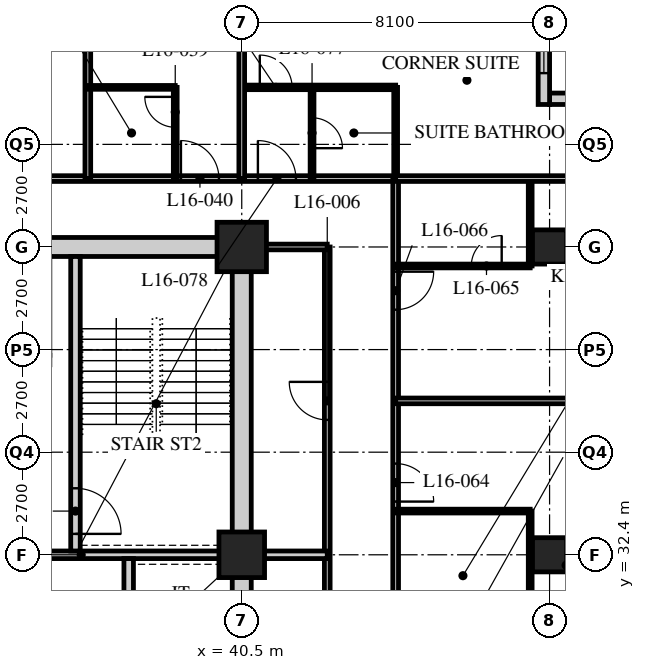
"""IFC4 building model, lengths in metres.
Left out: names, types, materials, properties, quantities, classifications, styles, units other than length and angle.
Written with IfcOpenShell. Run it as: python <this file> out.ifc"""

import sys

from ifc_helpers import new_model, si_unit, direction, frame, frame_2d, origin, origin_2d, place, context, subcontext, project, spatial, rectangle, hollow_rectangle, extrude, element, fill, save


model = new_model("IFC4")
c1 = context("Model", 3, precision=1e-05, world=origin(), true_north=direction((0.0, 1.0)))
c2 = subcontext(c1, "Body", "Model", "MODEL_VIEW")
j1 = project(units=[si_unit("LENGTHUNIT", "METRE"), si_unit("PLANEANGLEUNIT", "RADIAN")], contexts=[c1])
p1 = place(None, origin())
s1 = spatial("IfcSite", under=j1, at=p1, CompositionType="ELEMENT")
p2 = place(p1, origin())
s2 = spatial("IfcBuilding", under=s1, at=p2, CompositionType="ELEMENT")
p3 = place(p2, frame((0.0, 0.0, 67.0)))
s3 = spatial("IfcBuildingStorey", under=s2, at=p3, CompositionType="ELEMENT", Elevation=67.0)
p4 = place(p3, frame((40.5, 32.4, 0.0), z_axis=(0.0, 0.0, 1.0), x_axis=(1.0, 0.0, 0.0)))
e1 = element("IfcColumn", 1, at=p4, inside=s3, PredefinedType="COLUMN", context=c2, shape_type="SweptSolid", body=[
    extrude(hollow_rectangle(XDim=1.2, YDim=1.2, WallThickness=0.12, at=origin_2d()), origin(), (0.0, 0.0, 1.0), 3.4),
])
p5 = place(p3, frame((40.5, 40.5, 0.0), z_axis=(0.0, 0.0, 1.0), x_axis=(1.0, 0.0, 0.0)))
e2 = element("IfcColumn", 2, at=p5, inside=s3, PredefinedType="COLUMN", context=c2, shape_type="SweptSolid", body=[
    extrude(hollow_rectangle(XDim=1.3, YDim=1.3, WallThickness=0.13, at=origin_2d()), origin(), (0.0, 0.0, 1.0), 3.4),
])
for number, where, z_axis, x_axis in (
    (3, (48.6, 32.4, 0.0), (0.0, 0.0, 1.0), (1.0, 0.0, 0.0)),
    (4, (48.6, 40.5, 0.0), (0.0, 0.0, 1.0), (1.0, 0.0, 0.0)),
):
    element("IfcColumn", number, at=place(p3, frame(where, z_axis=z_axis, x_axis=x_axis)), inside=s3, PredefinedType="COLUMN", context=c2, shape_type="SweptSolid", body=[
        extrude(hollow_rectangle(XDim=0.9, YDim=0.9, WallThickness=0.09, at=origin_2d()), origin(), (0.0, 0.0, 1.0), 3.4),
    ])
p6 = place(p3, frame((52.35, 44.4, 0.0), z_axis=(0.0, 0.0, 1.0), x_axis=(-1.0, 0.0, 0.0)))
e5 = element("IfcWall", 5, at=p6, inside=s3, PredefinedType="SOLIDWALL", context=c2, shape_type="SweptSolid", body=[
    extrude(rectangle(XDim=3.75, YDim=0.3, at=frame_2d((1.875, 0.0))), origin(), (0.0, 0.0, 1.0), 3.19),
])
p7 = place(p6, frame((0.225, 0.0, 0.9)))
e6 = element("IfcOpeningElement", 6, at=p7, cuts=e5, PredefinedType="OPENING", context=c2, shape_type="SweptSolid", body=[
    extrude(rectangle(XDim=3.0, YDim=1.5, at=frame_2d((1.5, 0.75))), frame((0.0, 0.16, 0.0), z_axis=(0.0, -1.0, 0.0), x_axis=(1.0, 0.0, 0.0)), (0.0, 0.0, 1.0), 0.32),
])
p8 = place(p3, frame((48.45, 44.25, 0.0), z_axis=(0.0, 0.0, 1.0), x_axis=(0.0, 1.0, 0.0)))
e7 = element("IfcWall", 7, at=p8, inside=s3, PredefinedType="SOLIDWALL", context=c2, shape_type="SweptSolid", body=[
    extrude(rectangle(XDim=4.35, YDim=0.3, at=frame_2d((2.175, 0.0))), origin(), (0.0, 0.0, 1.0), 3.19),
])
p9 = place(p8, frame((0.825, 0.0, 0.9)))
e8 = element("IfcOpeningElement", 8, at=p9, cuts=e7, PredefinedType="OPENING", context=c2, shape_type="SweptSolid", body=[
    extrude(rectangle(XDim=3.0, YDim=1.5, at=frame_2d((1.5, 0.75))), frame((0.0, 0.16, 0.0), z_axis=(0.0, -1.0, 0.0), x_axis=(1.0, 0.0, 0.0)), (0.0, 0.0, 1.0), 0.32),
])
p10 = place(p3, frame((8.1, 42.3, 0.0), z_axis=(0.0, 0.0, 1.0), x_axis=(1.0, 0.0, 0.0)))
e9 = element("IfcWall", 9, at=p10, inside=s3, PredefinedType="PARTITIONING", context=c2, shape_type="SweptSolid", body=[
    extrude(rectangle(XDim=36.45, YDim=0.15, at=frame_2d((18.225, 0.0))), origin(), (0.0, 0.0, 1.0), 3.19),
])
p11 = place(p10, frame((9.5, 0.0, 0.0)))
e10 = element("IfcOpeningElement", 10, at=p11, cuts=e9, PredefinedType="OPENING", context=c2, shape_type="SweptSolid", body=[
    extrude(rectangle(XDim=1.0, YDim=2.1, at=frame_2d((0.5, 1.05))), frame((0.0, 0.085, 0.0), z_axis=(0.0, -1.0, 0.0), x_axis=(1.0, 0.0, 0.0)), (0.0, 0.0, 1.0), 0.17),
])
p12 = place(p10, frame((14.6, 0.0, 0.0)))
e11 = element("IfcOpeningElement", 11, at=p12, cuts=e9, PredefinedType="OPENING", context=c2, shape_type="SweptSolid", body=[
    extrude(rectangle(XDim=1.0, YDim=2.1, at=frame_2d((0.5, 1.05))), frame((0.0, 0.085, 0.0), z_axis=(0.0, -1.0, 0.0), x_axis=(1.0, 0.0, 0.0)), (0.0, 0.0, 1.0), 0.17),
])
p13 = place(p10, frame((18.65, 0.0, 0.0)))
e12 = element("IfcOpeningElement", 12, at=p13, cuts=e9, PredefinedType="OPENING", context=c2, shape_type="SweptSolid", body=[
    extrude(rectangle(XDim=1.0, YDim=2.1, at=frame_2d((0.5, 1.05))), frame((0.0, 0.085, 0.0), z_axis=(0.0, -1.0, 0.0), x_axis=(1.0, 0.0, 0.0)), (0.0, 0.0, 1.0), 0.17),
])
p14 = place(p10, frame((25.7, 0.0, 0.0)))
e13 = element("IfcOpeningElement", 13, at=p14, cuts=e9, PredefinedType="OPENING", context=c2, shape_type="SweptSolid", body=[
    extrude(rectangle(XDim=1.0, YDim=2.1, at=frame_2d((0.5, 1.05))), frame((0.0, 0.085, 0.0), z_axis=(0.0, -1.0, 0.0), x_axis=(1.0, 0.0, 0.0)), (0.0, 0.0, 1.0), 0.17),
])
p15 = place(p10, frame((30.8, 0.0, 0.0)))
e14 = element("IfcOpeningElement", 14, at=p15, cuts=e9, PredefinedType="OPENING", context=c2, shape_type="SweptSolid", body=[
    extrude(rectangle(XDim=1.0, YDim=2.1, at=frame_2d((0.5, 1.05))), frame((0.0, 0.085, 0.0), z_axis=(0.0, -1.0, 0.0), x_axis=(1.0, 0.0, 0.0)), (0.0, 0.0, 1.0), 0.17),
])
p16 = place(p10, frame((32.825, 0.0, 0.0)))
e15 = element("IfcOpeningElement", 15, at=p16, cuts=e9, PredefinedType="OPENING", context=c2, shape_type="SweptSolid", body=[
    extrude(rectangle(XDim=1.0, YDim=2.1, at=frame_2d((0.5, 1.05))), frame((0.0, 0.085, 0.0), z_axis=(0.0, -1.0, 0.0), x_axis=(1.0, 0.0, 0.0)), (0.0, 0.0, 1.0), 0.17),
])
p17 = place(p10, frame((2.625, 0.0, 0.0)))
e16 = element("IfcOpeningElement", 16, at=p17, cuts=e9, PredefinedType="OPENING", context=c2, shape_type="SweptSolid", body=[
    extrude(rectangle(XDim=1.0, YDim=2.1, at=frame_2d((0.5, 1.05))), frame((0.0, 0.085, 0.0), z_axis=(0.0, -1.0, 0.0), x_axis=(1.0, 0.0, 0.0)), (0.0, 0.0, 1.0), 0.17),
])
p18 = place(p3, frame((44.55, 12.15, 0.0), z_axis=(0.0, 0.0, 1.0), x_axis=(0.0, 1.0, 0.0)))
e17 = element("IfcWall", 17, at=p18, inside=s3, PredefinedType="PARTITIONING", context=c2, shape_type="SweptSolid", body=[
    extrude(rectangle(XDim=30.15, YDim=0.15, at=frame_2d((15.075, 0.0))), origin(), (0.0, 0.0, 1.0), 3.19),
])
p19 = place(p18, frame((2.45, 0.0, 0.0)))
e18 = element("IfcOpeningElement", 18, at=p19, cuts=e17, PredefinedType="OPENING", context=c2, shape_type="SweptSolid", body=[
    extrude(rectangle(XDim=1.0, YDim=2.1, at=frame_2d((0.5, 1.05))), frame((0.0, 0.085, 0.0), z_axis=(0.0, -1.0, 0.0), x_axis=(1.0, 0.0, 0.0)), (0.0, 0.0, 1.0), 0.17),
])
p20 = place(p18, frame((4.35, 0.0, 0.0)))
e19 = element("IfcOpeningElement", 19, at=p20, cuts=e17, PredefinedType="OPENING", context=c2, shape_type="SweptSolid", body=[
    extrude(rectangle(XDim=1.0, YDim=2.1, at=frame_2d((0.5, 1.05))), frame((0.0, 0.085, 0.0), z_axis=(0.0, -1.0, 0.0), x_axis=(1.0, 0.0, 0.0)), (0.0, 0.0, 1.0), 0.17),
])
p21 = place(p18, frame((8.4, 0.0, 0.0)))
e20 = element("IfcOpeningElement", 20, at=p21, cuts=e17, PredefinedType="OPENING", context=c2, shape_type="SweptSolid", body=[
    extrude(rectangle(XDim=1.0, YDim=2.1, at=frame_2d((0.5, 1.05))), frame((0.0, 0.085, 0.0), z_axis=(0.0, -1.0, 0.0), x_axis=(1.0, 0.0, 0.0)), (0.0, 0.0, 1.0), 0.17),
])
p22 = place(p18, frame((14.6, 0.0, 0.0)))
e21 = element("IfcOpeningElement", 21, at=p22, cuts=e17, PredefinedType="OPENING", context=c2, shape_type="SweptSolid", body=[
    extrude(rectangle(XDim=1.0, YDim=2.1, at=frame_2d((0.5, 1.05))), frame((0.0, 0.085, 0.0), z_axis=(0.0, -1.0, 0.0), x_axis=(1.0, 0.0, 0.0)), (0.0, 0.0, 1.0), 0.17),
])
p23 = place(p18, frame((21.65, 0.0, 0.0)))
e22 = element("IfcOpeningElement", 22, at=p23, cuts=e17, PredefinedType="OPENING", context=c2, shape_type="SweptSolid", body=[
    extrude(rectangle(XDim=1.0, YDim=2.1, at=frame_2d((0.5, 1.05))), frame((0.0, 0.085, 0.0), z_axis=(0.0, -1.0, 0.0), x_axis=(1.0, 0.0, 0.0)), (0.0, 0.0, 1.0), 0.17),
])
p24 = place(p18, frame((26.7, 0.0, 0.0)))
e23 = element("IfcOpeningElement", 23, at=p24, cuts=e17, PredefinedType="OPENING", context=c2, shape_type="SweptSolid", body=[
    extrude(rectangle(XDim=1.0, YDim=2.1, at=frame_2d((0.5, 1.05))), frame((0.0, 0.085, 0.0), z_axis=(0.0, -1.0, 0.0), x_axis=(1.0, 0.0, 0.0)), (0.0, 0.0, 1.0), 0.17),
])
p25 = place(p3, frame((42.75, 13.95, 0.0), z_axis=(0.0, 0.0, 1.0), x_axis=(0.0, 1.0, 0.0)))
e24 = element("IfcWall", 24, at=p25, inside=s3, PredefinedType="PARTITIONING", context=c2, shape_type="SweptSolid", body=[
    extrude(rectangle(XDim=26.55, YDim=0.15, at=frame_2d((13.275, 0.0))), origin(), (0.0, 0.0, 1.0), 3.19),
])
p26 = place(p25, frame((13.9, 0.0, 0.0)))
e25 = element("IfcOpeningElement", 25, at=p26, cuts=e24, PredefinedType="OPENING", context=c2, shape_type="SweptSolid", body=[
    extrude(rectangle(XDim=1.0, YDim=2.1, at=frame_2d((0.5, 1.05))), frame((0.0, 0.085, 0.0), z_axis=(0.0, -1.0, 0.0), x_axis=(1.0, 0.0, 0.0)), (0.0, 0.0, 1.0), 0.17),
])
p27 = place(p25, frame((22.0, 0.0, 0.0)))
e26 = element("IfcOpeningElement", 26, at=p27, cuts=e24, PredefinedType="OPENING", context=c2, shape_type="SweptSolid", body=[
    extrude(rectangle(XDim=1.0, YDim=2.1, at=frame_2d((0.5, 1.05))), frame((0.0, 0.085, 0.0), z_axis=(0.0, -1.0, 0.0), x_axis=(1.0, 0.0, 0.0)), (0.0, 0.0, 1.0), 0.17),
])
p28 = place(p3, frame((42.75, 40.5, 0.0), z_axis=(0.0, 0.0, 1.0), x_axis=(-1.0, 0.0, 0.0)))
e27 = element("IfcWall", 27, at=p28, inside=s3, PredefinedType="PARTITIONING", context=c2, shape_type="SweptSolid", body=[
    extrude(rectangle(XDim=2.05, YDim=0.15, at=frame_2d((1.025, 0.0))), origin(), (0.0, 0.0, 1.0), 2.578),
])
p29 = place(p3, frame((40.5, 32.4, 0.0), z_axis=(0.0, 0.0, 1.0), x_axis=(1.0, 0.0, 0.0)))
e28 = element("IfcWall", 28, at=p29, inside=s3, PredefinedType="SOLIDWALL", context=c2, shape_type="SweptSolid", body=[
    extrude(rectangle(XDim=2.25, YDim=0.2, at=frame_2d((1.125, 0.0))), origin(), (0.0, 0.0, 1.0), 2.578),
])
p30 = place(p3, frame((36.45, 42.3, 0.0), z_axis=(0.0, 0.0, 1.0), x_axis=(0.0, 1.0, 0.0)))
e29 = element("IfcWall", 29, at=p30, inside=s3, PredefinedType="PARTITIONING", context=c2, shape_type="SweptSolid", body=[
    extrude(rectangle(XDim=6.0, YDim=0.15, at=frame_2d((3.0, 0.0))), origin(), (0.0, 0.0, 1.0), 3.19),
])
p31 = place(p3, frame((36.45, 44.7, 0.0), z_axis=(0.0, 0.0, 1.0), x_axis=(1.0, 0.0, 0.0)))
e30 = element("IfcWall", 30, at=p31, inside=s3, PredefinedType="PARTITIONING", context=c2, shape_type="SweptSolid", body=[
    extrude(rectangle(XDim=2.3, YDim=0.1, at=frame_2d((1.15, 0.0))), origin(), (0.0, 0.0, 1.0), 3.19),
])
p32 = place(p3, frame((38.75, 42.3, 0.0), z_axis=(0.0, 0.0, 1.0), x_axis=(0.0, 1.0, 0.0)))
e31 = element("IfcWall", 31, at=p32, inside=s3, PredefinedType="PARTITIONING", context=c2, shape_type="SweptSolid", body=[
    extrude(rectangle(XDim=2.4, YDim=0.1, at=frame_2d((1.2, 0.0))), origin(), (0.0, 0.0, 1.0), 3.19),
])
p33 = place(p32, frame((1.35, 0.0, 0.0)))
e32 = element("IfcOpeningElement", 32, at=p33, cuts=e31, PredefinedType="OPENING", context=c2, shape_type="SweptSolid", body=[
    extrude(rectangle(XDim=0.8, YDim=2.1, at=frame_2d((0.4, 1.05))), frame((0.0, 0.06, 0.0), z_axis=(0.0, -1.0, 0.0), x_axis=(1.0, 0.0, 0.0)), (0.0, 0.0, 1.0), 0.12),
])
p34 = place(p3, frame((48.09, 30.15, 0.0), z_axis=(0.0, 0.0, 1.0), x_axis=(0.0, 1.0, 0.0)))
e33 = element("IfcWall", 33, at=p34, inside=s3, PredefinedType="PARTITIONING", context=c2, shape_type="SweptSolid", body=[
    extrude(rectangle(XDim=3.4, YDim=0.1, at=frame_2d((1.7, 0.0))), origin(), (0.0, 0.0, 1.0), 3.19),
])
p35 = place(p34, frame((0.5, 0.0, 0.0)))
e34 = element("IfcOpeningElement", 34, at=p35, cuts=e33, PredefinedType="OPENING", context=c2, shape_type="SweptSolid", body=[
    extrude(rectangle(XDim=0.8, YDim=2.1, at=frame_2d((0.4, 1.05))), frame((0.0, 0.06, 0.0), z_axis=(0.0, -1.0, 0.0), x_axis=(1.0, 0.0, 0.0)), (0.0, 0.0, 1.0), 0.12),
])
p36 = place(p3, frame((44.55, 33.55, 0.0), z_axis=(0.0, 0.0, 1.0), x_axis=(1.0, 0.0, 0.0)))
e35 = element("IfcWall", 35, at=p36, inside=s3, PredefinedType="PARTITIONING", context=c2, shape_type="SweptSolid", body=[
    extrude(rectangle(XDim=3.54, YDim=0.1, at=frame_2d((1.77, 0.0))), origin(), (0.0, 0.0, 1.0), 3.19),
])
p37 = place(p3, frame((44.55, 36.45, 0.0), z_axis=(0.0, 0.0, 1.0), x_axis=(1.0, 0.0, 0.0)))
e36 = element("IfcWall", 36, at=p37, inside=s3, PredefinedType="PARTITIONING", context=c2, shape_type="SweptSolid", body=[
    extrude(rectangle(XDim=11.85, YDim=0.15, at=frame_2d((5.925, 0.0))), origin(), (0.0, 0.0, 1.0), 3.19),
])
p38 = place(p3, frame((48.09, 40.0, 0.0), z_axis=(0.0, 0.0, 1.0), x_axis=(0.0, 1.0, 0.0)))
e37 = element("IfcWall", 37, at=p38, inside=s3, PredefinedType="PARTITIONING", context=c2, shape_type="SweptSolid", body=[
    extrude(rectangle(XDim=2.3, YDim=0.1, at=frame_2d((1.15, 0.0))), origin(), (0.0, 0.0, 1.0), 3.19),
])
p39 = place(p3, frame((44.55, 40.0, 0.0), z_axis=(0.0, 0.0, 1.0), x_axis=(1.0, 0.0, 0.0)))
e38 = element("IfcWall", 38, at=p39, inside=s3, PredefinedType="PARTITIONING", context=c2, shape_type="SweptSolid", body=[
    extrude(rectangle(XDim=3.54, YDim=0.1, at=frame_2d((1.77, 0.0))), origin(), (0.0, 0.0, 1.0), 3.19),
])
p40 = place(p39, frame((1.99, 0.0, 0.0)))
e39 = element("IfcOpeningElement", 39, at=p40, cuts=e38, PredefinedType="OPENING", context=c2, shape_type="SweptSolid", body=[
    extrude(rectangle(XDim=0.8, YDim=2.1, at=frame_2d((0.4, 1.05))), frame((0.0, 0.06, 0.0), z_axis=(0.0, -1.0, 0.0), x_axis=(1.0, 0.0, 0.0)), (0.0, 0.0, 1.0), 0.12),
])
p41 = place(p3, frame((40.5, 44.7, 0.0), z_axis=(0.0, 0.0, 1.0), x_axis=(1.0, 0.0, 0.0)))
e40 = element("IfcWall", 40, at=p41, inside=s3, PredefinedType="PARTITIONING", context=c2, shape_type="SweptSolid", body=[
    extrude(rectangle(XDim=4.05, YDim=0.12, at=frame_2d((2.025, 0.0))), origin(), (0.0, 0.0, 1.0), 3.19),
])
p42 = place(p41, frame((0.475, 0.0, 0.0)))
e41 = element("IfcOpeningElement", 41, at=p42, cuts=e40, PredefinedType="OPENING", context=c2, shape_type="SweptSolid", body=[
    extrude(rectangle(XDim=0.85, YDim=2.1, at=frame_2d((0.425, 1.05))), frame((0.0, 0.07, 0.0), z_axis=(0.0, -1.0, 0.0), x_axis=(1.0, 0.0, 0.0)), (0.0, 0.0, 1.0), 0.14),
])
p43 = place(p3, frame((42.35, 42.3, 0.0), z_axis=(0.0, 0.0, 1.0), x_axis=(0.0, 1.0, 0.0)))
e42 = element("IfcWall", 42, at=p43, inside=s3, PredefinedType="PARTITIONING", context=c2, shape_type="SweptSolid", body=[
    extrude(rectangle(XDim=2.4, YDim=0.1, at=frame_2d((1.2, 0.0))), origin(), (0.0, 0.0, 1.0), 3.19),
])
p44 = place(p43, frame((0.8, 0.0, 0.0)))
e43 = element("IfcOpeningElement", 43, at=p44, cuts=e42, PredefinedType="OPENING", context=c2, shape_type="SweptSolid", body=[
    extrude(rectangle(XDim=0.8, YDim=2.1, at=frame_2d((0.4, 1.05))), frame((0.0, 0.06, 0.0), z_axis=(0.0, -1.0, 0.0), x_axis=(1.0, 0.0, 0.0)), (0.0, 0.0, 1.0), 0.12),
])
p45 = place(p3, frame((44.55, 42.3, 0.0), z_axis=(0.0, 0.0, 1.0), x_axis=(0.0, 1.0, 0.0)))
e44 = element("IfcWall", 44, at=p45, inside=s3, PredefinedType="PARTITIONING", context=c2, shape_type="SweptSolid", body=[
    extrude(rectangle(XDim=2.4, YDim=0.1, at=frame_2d((1.2, 0.0))), origin(), (0.0, 0.0, 1.0), 3.19),
])
p46 = place(p3, frame((44.55, 42.3, 0.0), z_axis=(0.0, 0.0, 1.0), x_axis=(1.0, 0.0, 0.0)))
e45 = element("IfcWall", 45, at=p46, inside=s3, PredefinedType="PARTITIONING", context=c2, shape_type="SweptSolid", body=[
    extrude(rectangle(XDim=7.8, YDim=0.15, at=frame_2d((3.9, 0.0))), origin(), (0.0, 0.0, 1.0), 3.19),
])
p47 = place(p3, frame((40.5, 42.3, 0.0), z_axis=(0.0, 0.0, 1.0), x_axis=(0.0, 1.0, 0.0)))
e46 = element("IfcWall", 46, at=p47, inside=s3, PredefinedType="PARTITIONING", context=c2, shape_type="SweptSolid", body=[
    extrude(rectangle(XDim=6.0, YDim=0.15, at=frame_2d((3.0, 0.0))), origin(), (0.0, 0.0, 1.0), 2.578),
])
p48 = place(p3, frame((15.95, 40.5, 0.0), z_axis=(0.0, 0.0, 1.0), x_axis=(1.0, 0.0, 0.0)))
e47 = element("IfcWall", 47, at=p48, inside=s3, PredefinedType="SOLIDWALL", context=c2, shape_type="SweptSolid", body=[
    extrude(rectangle(XDim=24.8, YDim=0.5, at=frame_2d((12.4, 0.0))), origin(), (0.0, 0.0, 1.0), 2.54),
])
p49 = place(p48, frame((11.5, 0.0, 0.0)))
e48 = element("IfcOpeningElement", 48, at=p49, cuts=e47, PredefinedType="OPENING", context=c2, shape_type="SweptSolid", body=[
    extrude(rectangle(XDim=1.8, YDim=2.4, at=frame_2d((0.9, 1.2))), frame((0.0, 0.26, 0.0), z_axis=(0.0, -1.0, 0.0), x_axis=(1.0, 0.0, 0.0)), (0.0, 0.0, 1.0), 0.52),
])
p50 = place(p3, frame((40.5, 24.55, 0.0), z_axis=(0.0, 0.0, 1.0), x_axis=(0.0, 1.0, 0.0)))
e49 = element("IfcWall", 49, at=p50, inside=s3, PredefinedType="SOLIDWALL", context=c2, shape_type="SweptSolid", body=[
    extrude(rectangle(XDim=15.7, YDim=0.5, at=frame_2d((7.85, 0.0))), origin(), (0.0, 0.0, 1.0), 2.578),
])
p51 = place(p3, frame((32.3, 32.4, 0.0), z_axis=(0.0, 0.0, 1.0), x_axis=(1.0, 0.0, 0.0)))
e50 = element("IfcWall", 50, at=p51, inside=s3, PredefinedType="SOLIDWALL", context=c2, shape_type="SweptSolid", body=[
    extrude(rectangle(XDim=7.95, YDim=0.2, at=frame_2d((3.975, 0.0))), origin(), (0.0, 0.0, 1.0), 2.578),
])
p52 = place(p3, frame((37.525, 24.55, 0.0), z_axis=(0.0, 0.0, 1.0), x_axis=(0.0, 1.0, 0.0)))
e51 = element("IfcWall", 51, at=p52, inside=s3, PredefinedType="SOLIDWALL", context=c2, shape_type="SweptSolid", body=[
    extrude(rectangle(XDim=7.75, YDim=0.25, at=frame_2d((3.875, 0.0))), origin(), (0.0, 0.0, 1.0), 3.19),
])
p53 = place(p3, frame((36.125, 32.5, 0.0), z_axis=(0.0, 0.0, 1.0), x_axis=(0.0, 1.0, 0.0)))
e52 = element("IfcWall", 52, at=p53, inside=s3, PredefinedType="SOLIDWALL", context=c2, shape_type="SweptSolid", body=[
    extrude(rectangle(XDim=7.75, YDim=0.25, at=frame_2d((3.875, 0.0))), origin(), (0.0, 0.0, 1.0), 3.19),
])
p54 = place(p53, frame((0.45, 0.0, 0.0)))
e53 = element("IfcOpeningElement", 53, at=p54, cuts=e52, PredefinedType="OPENING", context=c2, shape_type="SweptSolid", body=[
    extrude(rectangle(XDim=1.2, YDim=2.1, at=frame_2d((0.6, 1.05))), frame((0.0, 0.135, 0.0), z_axis=(0.0, -1.0, 0.0), x_axis=(1.0, 0.0, 0.0)), (0.0, 0.0, 1.0), 0.27),
])
p55 = place(p9, origin())
e54 = element("IfcWindow", 54, at=p55, inside=s3, PartitioningType="SINGLE_PANEL", PredefinedType="WINDOW", context=c2, shape_type="SweptSolid", body=[
    extrude(rectangle(XDim=3.0, YDim=1.5, at=frame_2d((1.5, 0.75))), frame((0.0, 0.03, 0.0), z_axis=(0.0, -1.0, 0.0), x_axis=(1.0, 0.0, 0.0)), (0.0, 0.0, 1.0), 0.06),
])
fill(e8, e54)
p56 = place(p27, origin())
e55 = element("IfcDoor", 55, at=p56, inside=s3, OperationType="SINGLE_SWING_RIGHT", PredefinedType="DOOR", context=c2, shape_type="SweptSolid", body=[
    extrude(rectangle(XDim=1.0, YDim=2.1, at=frame_2d((0.5, 1.05))), frame((0.0, 0.025, 0.0), z_axis=(0.0, -1.0, 0.0), x_axis=(1.0, 0.0, 0.0)), (0.0, 0.0, 1.0), 0.05),
])
fill(e26, e55)
p57 = place(p33, origin())
e56 = element("IfcDoor", 56, at=p57, inside=s3, OperationType="SINGLE_SWING_RIGHT", PredefinedType="DOOR", context=c2, shape_type="SweptSolid", body=[
    extrude(rectangle(XDim=0.8, YDim=2.1, at=frame_2d((0.4, 1.05))), frame((0.0, 0.025, 0.0), z_axis=(0.0, -1.0, 0.0), x_axis=(1.0, 0.0, 0.0)), (0.0, 0.0, 1.0), 0.05),
])
fill(e32, e56)
p58 = place(p15, origin())
e57 = element("IfcDoor", 57, at=p58, inside=s3, OperationType="SINGLE_SWING_LEFT", PredefinedType="DOOR", context=c2, shape_type="SweptSolid", body=[
    extrude(rectangle(XDim=1.0, YDim=2.1, at=frame_2d((0.5, 1.05))), frame((0.0, 0.025, 0.0), z_axis=(0.0, -1.0, 0.0), x_axis=(1.0, 0.0, 0.0)), (0.0, 0.0, 1.0), 0.05),
])
fill(e14, e57)
p59 = place(p23, origin())
e58 = element("IfcDoor", 58, at=p59, inside=s3, OperationType="SINGLE_SWING_RIGHT", PredefinedType="DOOR", context=c2, shape_type="SweptSolid", body=[
    extrude(rectangle(XDim=1.0, YDim=2.1, at=frame_2d((0.5, 1.05))), frame((0.0, 0.025, 0.0), z_axis=(0.0, -1.0, 0.0), x_axis=(1.0, 0.0, 0.0)), (0.0, 0.0, 1.0), 0.05),
])
fill(e22, e58)
p60 = place(p40, origin())
e59 = element("IfcDoor", 59, at=p60, inside=s3, OperationType="SINGLE_SWING_RIGHT", PredefinedType="DOOR", context=c2, shape_type="SweptSolid", body=[
    extrude(rectangle(XDim=0.8, YDim=2.1, at=frame_2d((0.4, 1.05))), frame((0.0, 0.025, 0.0), z_axis=(0.0, -1.0, 0.0), x_axis=(1.0, 0.0, 0.0)), (0.0, 0.0, 1.0), 0.05),
])
fill(e39, e59)
p61 = place(p24, origin())
e60 = element("IfcDoor", 60, at=p61, inside=s3, OperationType="SINGLE_SWING_LEFT", PredefinedType="DOOR", context=c2, shape_type="SweptSolid", body=[
    extrude(rectangle(XDim=1.0, YDim=2.1, at=frame_2d((0.5, 1.05))), frame((0.0, 0.025, 0.0), z_axis=(0.0, -1.0, 0.0), x_axis=(1.0, 0.0, 0.0)), (0.0, 0.0, 1.0), 0.05),
])
fill(e23, e60)
p62 = place(p44, origin())
e61 = element("IfcDoor", 61, at=p62, inside=s3, OperationType="SINGLE_SWING_RIGHT", PredefinedType="DOOR", context=c2, shape_type="SweptSolid", body=[
    extrude(rectangle(XDim=0.8, YDim=2.1, at=frame_2d((0.4, 1.05))), frame((0.0, 0.025, 0.0), z_axis=(0.0, -1.0, 0.0), x_axis=(1.0, 0.0, 0.0)), (0.0, 0.0, 1.0), 0.05),
])
fill(e43, e61)
p63 = place(p16, origin())
e62 = element("IfcDoor", 62, at=p63, inside=s3, OperationType="SINGLE_SWING_LEFT", PredefinedType="DOOR", context=c2, shape_type="SweptSolid", body=[
    extrude(rectangle(XDim=1.0, YDim=2.1, at=frame_2d((0.5, 1.05))), frame((0.0, 0.025, 0.0), z_axis=(0.0, -1.0, 0.0), x_axis=(1.0, 0.0, 0.0)), (0.0, 0.0, 1.0), 0.05),
])
fill(e15, e62)
p64 = place(p42, origin())
e63 = element("IfcDoor", 63, at=p64, inside=s3, OperationType="SINGLE_SWING_LEFT", PredefinedType="DOOR", context=c2, shape_type="SweptSolid", body=[
    extrude(rectangle(XDim=0.85, YDim=2.1, at=frame_2d((0.425, 1.05))), frame((0.0, 0.025, 0.0), z_axis=(0.0, -1.0, 0.0), x_axis=(1.0, 0.0, 0.0)), (0.0, 0.0, 1.0), 0.05),
])
fill(e41, e63)
p65 = place(p54, origin())
e64 = element("IfcDoor", 64, at=p65, inside=s3, OperationType="SINGLE_SWING_RIGHT", PredefinedType="DOOR", context=c2, shape_type="SweptSolid", body=[
    extrude(rectangle(XDim=1.2, YDim=2.1, at=frame_2d((0.6, 1.05))), frame((0.0, 0.025, 0.0), z_axis=(0.0, -1.0, 0.0), x_axis=(1.0, 0.0, 0.0)), (0.0, 0.0, 1.0), 0.05),
])
fill(e53, e64)
save(model, sys.argv[1])
